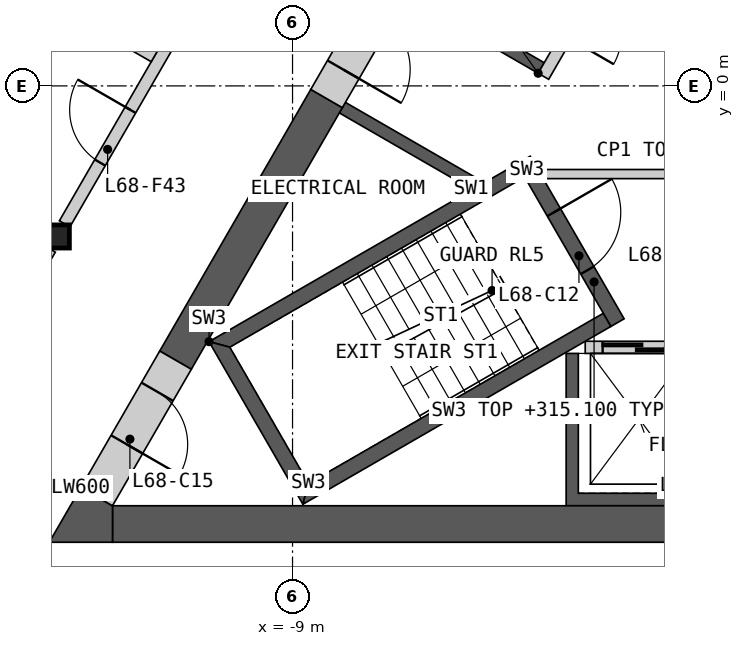
"""IFC4 building model, lengths in metres.
Left out: names, types, materials, properties, quantities, classifications, styles, units other than length and angle.
Written with IfcOpenShell. Run it as: python <this file> out.ifc"""

import sys

from ifc_helpers import new_model, si_unit, direction, frame, frame_2d, origin, origin_2d, place, context, subcontext, project, spatial, polyline, rectangle, i_section, outline, extrude, element, fill, save


model = new_model("IFC4")
c1 = context("Model", 3, precision=1e-05, world=origin(), true_north=direction((0.0, 1.0)))
c2 = subcontext(c1, "Body", "Model", "MODEL_VIEW")
j1 = project(units=[si_unit("LENGTHUNIT", "METRE"), si_unit("PLANEANGLEUNIT", "RADIAN")], contexts=[c1])
p1 = place(None, origin())
s1 = spatial("IfcSite", under=j1, at=p1, CompositionType="ELEMENT")
p2 = place(p1, origin())
s2 = spatial("IfcBuilding", under=s1, at=p2, CompositionType="ELEMENT")
p3 = place(p2, frame((0.0, 0.0, 312.0)))
s3 = spatial("IfcBuildingStorey", under=s2, at=p3, CompositionType="ELEMENT", Elevation=312.0)
p4 = place(p3, frame((-12.868, -2.476, 0.0), z_axis=(0.0, 0.0, 1.0), x_axis=(1.0, 0.0, 0.0)))
e1 = element("IfcColumn", 1, at=p4, inside=s3, PredefinedType="COLUMN", context=c2, shape_type="SweptSolid", body=[
    extrude(i_section(OverallWidth=0.396, OverallDepth=0.381, WebThickness=0.019, FlangeThickness=0.03, at=origin_2d()), origin(), (0.0, 0.0, 1.0), 3.4),
])
p5 = place(p3, origin())
e2 = element("IfcWall", 2, at=p5, inside=s3, PredefinedType="SHEAR", context=c2, shape_type="SweptSolid", body=[
    extrude(outline(polyline([(4.5, -4.4), (4.5, -6.906), (-4.5, -6.906), (-4.5, -4.4), (-4.3, -4.4), (-4.3, -6.7), (-2.3, -6.7), (-2.3, -4.4), (-2.1, -4.4), (-2.1, -6.7), (-0.1, -6.7), (-0.1, -4.4), (0.1, -4.4), (0.1, -6.7), (2.1, -6.7), (2.1, -4.4), (2.3, -4.4), (2.3, -6.7), (4.3, -6.7), (4.3, -4.4), (4.5, -4.4)])), origin(), (0.0, 0.0, 1.0), 3.1),
])
p6 = place(p3, frame((-4.187, -4.3, 0.0), z_axis=(0.0, 0.0, 1.0), x_axis=(1.0, 0.0, 0.0)))
e3 = element("IfcWall", 3, at=p6, inside=s3, PredefinedType="SOLIDWALL", context=c2, shape_type="SweptSolid", body=[
    extrude(rectangle(XDim=8.373, YDim=0.2, at=frame_2d((4.187, 0.0))), origin(), (0.0, 0.0, 1.0), 3.1),
])
p7 = place(p6, frame((0.287, 0.0, 0.0)))
e4 = element("IfcOpeningElement", 4, at=p7, cuts=e3, PredefinedType="OPENING", context=c2, shape_type="SweptSolid", body=[
    extrude(rectangle(XDim=1.2, YDim=2.1, at=frame_2d((0.6, 1.05))), frame((0.0, 0.11, 0.0), z_axis=(0.0, -1.0, 0.0), x_axis=(1.0, 0.0, 0.0)), (0.0, 0.0, 1.0), 0.22),
])
p8 = place(p6, frame((2.387, 0.0, 0.0)))
e5 = element("IfcOpeningElement", 5, at=p8, cuts=e3, PredefinedType="OPENING", context=c2, shape_type="SweptSolid", body=[
    extrude(rectangle(XDim=1.4, YDim=2.1, at=frame_2d((0.7, 1.05))), frame((0.0, 0.11, 0.0), z_axis=(0.0, -1.0, 0.0), x_axis=(1.0, 0.0, 0.0)), (0.0, 0.0, 1.0), 0.22),
])
p9 = place(p6, frame((4.737, 0.0, 0.0)))
e6 = element("IfcOpeningElement", 6, at=p9, cuts=e3, PredefinedType="OPENING", context=c2, shape_type="SweptSolid", body=[
    extrude(rectangle(XDim=1.1, YDim=2.1, at=frame_2d((0.55, 1.05))), frame((0.0, 0.11, 0.0), z_axis=(0.0, -1.0, 0.0), x_axis=(1.0, 0.0, 0.0)), (0.0, 0.0, 1.0), 0.22),
])
p10 = place(p6, frame((6.887, 0.0, 0.0)))
e7 = element("IfcOpeningElement", 7, at=p10, cuts=e3, PredefinedType="OPENING", context=c2, shape_type="SweptSolid", body=[
    extrude(rectangle(XDim=1.2, YDim=2.1, at=frame_2d((0.6, 1.05))), frame((0.0, 0.11, 0.0), z_axis=(0.0, -1.0, 0.0), x_axis=(1.0, 0.0, 0.0)), (0.0, 0.0, 1.0), 0.22),
])
p11 = place(p3, origin())
e8 = element("IfcWall", 8, at=p11, inside=s3, PredefinedType="SHEAR", context=c2, shape_type="SweptSolid", body=[
    extrude(outline(polyline([(-6.061, -1.697), (-8.231, -0.444), (-8.131, -0.271), (-5.96, -1.524), (-6.061, -1.697)])), origin(), (0.0, 0.0, 1.0), 3.1),
])
p12 = place(p3, origin())
e9 = element("IfcWall", 9, at=p12, inside=s3, PredefinedType="SHEAR", context=c2, shape_type="SweptSolid", body=[
    extrude(outline(polyline([(-4.96, 0.208), (-7.131, 1.461), (-3.731, 7.35), (-1.561, 6.097), (-1.66, 5.924), (-3.652, 7.074), (-5.752, 3.437), (-3.76, 2.287), (-3.861, 2.113), (-5.852, 3.263), (-6.852, 1.531), (-4.861, 0.381), (-4.96, 0.208)])), origin(), (0.0, 0.0, 1.0), 3.1),
])
p13 = place(p3, frame((-1.631, 5.776, 0.0), z_axis=(0.0, 0.0, 1.0), x_axis=(-0.499992876559, -0.866029516466, 0.0)))
e10 = element("IfcWall", 10, at=p13, inside=s3, PredefinedType="SOLIDWALL", context=c2, shape_type="SweptSolid", body=[
    extrude(rectangle(XDim=6.486, YDim=0.2, at=frame_2d((3.243, 0.0))), origin(), (0.0, 0.0, 1.0), 3.1),
])
p14 = place(p13, frame((1.537, 0.0, 0.0)))
e11 = element("IfcOpeningElement", 11, at=p14, cuts=e10, PredefinedType="OPENING", context=c2, shape_type="SweptSolid", body=[
    extrude(rectangle(XDim=0.9, YDim=2.1, at=frame_2d((0.45, 1.05))), frame((0.0, 0.11, 0.0), z_axis=(0.0, -1.0, 0.0), x_axis=(1.0, 0.0, 0.0)), (0.0, 0.0, 1.0), 0.22),
])
p15 = place(p13, frame((4.837, 0.0, 0.0)))
e12 = element("IfcOpeningElement", 12, at=p15, cuts=e10, PredefinedType="OPENING", context=c2, shape_type="SweptSolid", body=[
    extrude(rectangle(XDim=0.9, YDim=2.1, at=frame_2d((0.45, 1.05))), frame((0.0, 0.11, 0.0), z_axis=(0.0, -1.0, 0.0), x_axis=(1.0, 0.0, 0.0)), (0.0, 0.0, 1.0), 0.22),
])
p16 = place(p3, frame((-4.941, -1.45, 0.0), z_axis=(0.0, 0.0, 1.0), x_axis=(1.0, 0.0, 0.0)))
e13 = element("IfcWall", 13, at=p16, inside=s3, PredefinedType="PARTITIONING", context=c2, shape_type="SweptSolid", body=[
    extrude(rectangle(XDim=9.882, YDim=0.15, at=frame_2d((4.941, 0.0))), origin(), (0.0, 0.0, 1.0), 3.1),
])
p17 = place(p16, frame((4.391, 0.0, 0.0)))
e14 = element("IfcOpeningElement", 14, at=p17, cuts=e13, PredefinedType="OPENING", context=c2, shape_type="SweptSolid", body=[
    extrude(rectangle(XDim=1.1, YDim=2.1, at=frame_2d((0.55, 1.05))), frame((0.0, 0.085, 0.0), z_axis=(0.0, -1.0, 0.0), x_axis=(1.0, 0.0, 0.0)), (0.0, 0.0, 1.0), 0.17),
])
p18 = place(p3, origin())
e15 = element("IfcWall", 15, at=p18, inside=s3, PredefinedType="SHEAR", context=c2, shape_type="SweptSolid", body=[
    extrude(outline(polyline([(-5.307, -1.281), (-10.374, -4.206), (-10.032, -4.298), (-5.182, -1.498), (-5.307, -1.281)])), origin(), (0.0, 0.0, 1.0), 3.1),
])
p19 = place(p3, origin())
e16 = element("IfcWall", 16, at=p19, inside=s3, PredefinedType="SHEAR", context=c2, shape_type="SweptSolid", body=[
    extrude(outline(polyline([(-10.374, -4.206), (-8.83, -6.881), (-8.738, -6.539), (-10.032, -4.298), (-10.374, -4.206)])), origin(), (0.0, 0.0, 1.0), 3.1),
])
p20 = place(p3, origin())
e17 = element("IfcWall", 17, at=p20, inside=s3, PredefinedType="SHEAR", context=c2, shape_type="SweptSolid", body=[
    extrude(outline(polyline([(-8.738, -6.539), (-8.83, -6.881), (-3.763, -3.956), (-3.888, -3.739), (-8.738, -6.539)])), origin(), (0.0, 0.0, 1.0), 3.1),
])
p21 = place(p3, frame((-5.199, -1.219, 0.0), z_axis=(0.0, 0.0, 1.0), x_axis=(0.499982516597, -0.866035497597, 0.0)))
e18 = element("IfcWall", 18, at=p21, inside=s3, PredefinedType="SHEAR", context=c2, shape_type="SweptSolid", body=[
    extrude(rectangle(XDim=3.088, YDim=0.25, at=frame_2d((1.544, 0.0))), origin(), (0.0, 0.0, 1.0), 3.1),
])
p22 = place(p21, frame((0.994, 0.0, 0.0)))
e19 = element("IfcOpeningElement", 19, at=p22, cuts=e18, PredefinedType="OPENING", context=c2, shape_type="SweptSolid", body=[
    extrude(rectangle(XDim=1.1, YDim=2.1, at=frame_2d((0.55, 1.05))), frame((0.0, 0.135, 0.0), z_axis=(0.0, -1.0, 0.0), x_axis=(1.0, 0.0, 0.0)), (0.0, 0.0, 1.0), 0.27),
])
p23 = place(p3, frame((-11.961, -7.206, 0.0), z_axis=(0.0, 0.0, 1.0), x_axis=(1.0, 0.0, 0.0)))
e20 = element("IfcWall", 20, at=p23, inside=s3, PredefinedType="SHEAR", context=c2, shape_type="SweptSolid", body=[
    extrude(rectangle(XDim=23.921, YDim=0.6, at=frame_2d((11.961, 0.0))), origin(), (0.0, 0.0, 1.0), 3.1),
])
p24 = place(p3, frame((-8.44, -0.208, 0.0), z_axis=(0.0, 0.0, 1.0), x_axis=(-0.500007425856, -0.866021116422, 0.0)))
e21 = element("IfcWall", 21, at=p24, inside=s3, PredefinedType="SHEAR", context=c2, shape_type="SweptSolid", body=[
    extrude(rectangle(XDim=4.969, YDim=0.6, at=frame_2d((2.484, 0.0))), origin(), (0.0, 0.0, 1.0), 3.1),
])
p25 = place(p3, origin())
e22 = element("IfcWall", 22, at=p25, inside=s3, PredefinedType="SHEAR", context=c2, shape_type="SweptSolid", body=[
    extrude(outline(polyline([(-12.48, -6.606), (-11.961, -6.906), (-11.961, -7.506), (-13.0, -7.506), (-12.48, -6.606)])), origin(), (0.0, 0.0, 1.0), 3.1),
])
p26 = place(p3, frame((-10.925, -4.511, 0.0), z_axis=(0.0, 0.0, 1.0), x_axis=(-0.500018667571, -0.866014625789, 0.0)))
e23 = element("IfcWall", 23, at=p26, inside=s3, PredefinedType="SHEAR", context=c2, shape_type="SweptSolid", body=[
    extrude(rectangle(XDim=2.592, YDim=0.6, at=frame_2d((1.296, 0.0))), origin(), (0.0, 0.0, 1.0), 3.1),
])
p27 = place(p26, frame((0.6, 0.0, 0.0)))
e24 = element("IfcOpeningElement", 24, at=p27, cuts=e23, PredefinedType="OPENING", context=c2, shape_type="SweptSolid", body=[
    extrude(rectangle(XDim=1.0, YDim=2.1, at=frame_2d((0.5, 1.05))), frame((0.0, 0.31, 0.0), z_axis=(0.0, -1.0, 0.0), x_axis=(1.0, 0.0, 0.0)), (0.0, 0.0, 1.0), 0.62),
])
p28 = place(p3, frame((-7.34, 1.698, 0.0), z_axis=(0.0, 0.0, 1.0), x_axis=(-0.50002983664, -0.866008176907, 0.0)))
e25 = element("IfcWall", 25, at=p28, inside=s3, PredefinedType="SHEAR", context=c2, shape_type="SweptSolid", body=[
    extrude(rectangle(XDim=2.2, YDim=0.6, at=frame_2d((1.1, 0.0))), origin(), (0.0, 0.0, 1.0), 3.1),
])
p29 = place(p28, frame((0.55, 0.0, 0.0)))
e26 = element("IfcOpeningElement", 26, at=p29, cuts=e25, PredefinedType="OPENING", context=c2, shape_type="SweptSolid", body=[
    extrude(rectangle(XDim=1.1, YDim=2.1, at=frame_2d((0.55, 1.05))), frame((0.0, 0.31, 0.0), z_axis=(0.0, -1.0, 0.0), x_axis=(1.0, 0.0, 0.0)), (0.0, 0.0, 1.0), 0.62),
])
p30 = place(p3, frame((-12.748, -2.269, 0.0), z_axis=(0.0, 0.0, 1.0), x_axis=(0.499984266882, 0.866034487114, 0.0)))
e27 = element("IfcWall", 27, at=p30, inside=s3, PredefinedType="PARTITIONING", context=c2, shape_type="SweptSolid", body=[
    extrude(rectangle(XDim=8.099, YDim=0.2, at=frame_2d((4.049, 0.0))), origin(), (0.0, 0.0, 1.0), 3.1),
])
p31 = place(p30, frame((1.164, 0.0, 0.0)))
e28 = element("IfcOpeningElement", 28, at=p31, cuts=e27, PredefinedType="OPENING", context=c2, shape_type="SweptSolid", body=[
    extrude(rectangle(XDim=1.0, YDim=2.1, at=frame_2d((0.5, 1.05))), frame((0.0, 0.11, 0.0), z_axis=(0.0, -1.0, 0.0), x_axis=(1.0, 0.0, 0.0)), (0.0, 0.0, 1.0), 0.22),
])
p32 = place(p3, frame((-16.055, 3.273, 0.0), z_axis=(0.0, 0.0, 1.0), x_axis=(0.866019581949, -0.500010083578, 0.0)))
e29 = element("IfcWall", 29, at=p32, inside=s3, PredefinedType="PARTITIONING", context=c2, shape_type="SweptSolid", body=[
    extrude(rectangle(XDim=5.535, YDim=0.25, at=frame_2d((2.768, 0.0))), origin(), (0.0, 0.0, 1.0), 2.33),
])
p33 = place(p3, frame((-15.131, -6.397, 0.0), z_axis=(0.0, 0.0, 1.0), x_axis=(0.500003406062, 0.866023437285, 0.0)))
e30 = element("IfcWall", 30, at=p33, inside=s3, PredefinedType="PARTITIONING", context=c2, shape_type="SweptSolid", body=[
    extrude(rectangle(XDim=4.288, YDim=0.2, at=frame_2d((2.144, 0.0))), origin(), (0.0, 0.0, 1.0), 3.1),
])
p34 = place(p7, origin())
e31 = element("IfcDoor", 31, at=p34, inside=s3, OperationType="SLIDING_TO_LEFT", PredefinedType="DOOR", context=c2, shape_type="SweptSolid", body=[
    extrude(rectangle(XDim=1.2, YDim=2.1, at=frame_2d((0.6, 1.05))), frame((0.0, 0.025, 0.0), z_axis=(0.0, -1.0, 0.0), x_axis=(1.0, 0.0, 0.0)), (0.0, 0.0, 1.0), 0.05),
])
fill(e4, e31)
p35 = place(p22, origin())
e32 = element("IfcDoor", 32, at=p35, inside=s3, OperationType="SINGLE_SWING_LEFT", PredefinedType="DOOR", context=c2, shape_type="SweptSolid", body=[
    extrude(rectangle(XDim=1.1, YDim=2.1, at=frame_2d((0.55, 1.05))), frame((0.0, 0.025, 0.0), z_axis=(0.0, -1.0, 0.0), x_axis=(1.0, 0.0, 0.0)), (0.0, 0.0, 1.0), 0.05),
])
fill(e19, e32)
p36 = place(p27, origin())
e33 = element("IfcDoor", 33, at=p36, inside=s3, OperationType="SINGLE_SWING_RIGHT", PredefinedType="DOOR", context=c2, shape_type="SweptSolid", body=[
    extrude(rectangle(XDim=1.0, YDim=2.1, at=frame_2d((0.5, 1.05))), frame((0.0, 0.055, 0.0), z_axis=(0.0, -1.0, 0.0), x_axis=(1.0, 0.0, 0.0)), (0.0, 0.0, 1.0), 0.05),
])
fill(e24, e33)
p37 = place(p29, origin())
e34 = element("IfcDoor", 34, at=p37, inside=s3, OperationType="SINGLE_SWING_RIGHT", PredefinedType="DOOR", context=c2, shape_type="SweptSolid", body=[
    extrude(rectangle(XDim=1.1, YDim=2.1, at=frame_2d((0.55, 1.05))), frame((0.0, 0.055, 0.0), z_axis=(0.0, -1.0, 0.0), x_axis=(1.0, 0.0, 0.0)), (0.0, 0.0, 1.0), 0.05),
])
fill(e26, e34)
p38 = place(p31, origin())
e35 = element("IfcDoor", 35, at=p38, inside=s3, OperationType="SINGLE_SWING_RIGHT", PredefinedType="DOOR", context=c2, shape_type="SweptSolid", body=[
    extrude(rectangle(XDim=1.0, YDim=2.1, at=frame_2d((0.5, 1.05))), frame((0.0, 0.025, 0.0), z_axis=(0.0, -1.0, 0.0), x_axis=(1.0, 0.0, 0.0)), (0.0, 0.0, 1.0), 0.05),
])
fill(e28, e35)
save(model, sys.argv[1])
